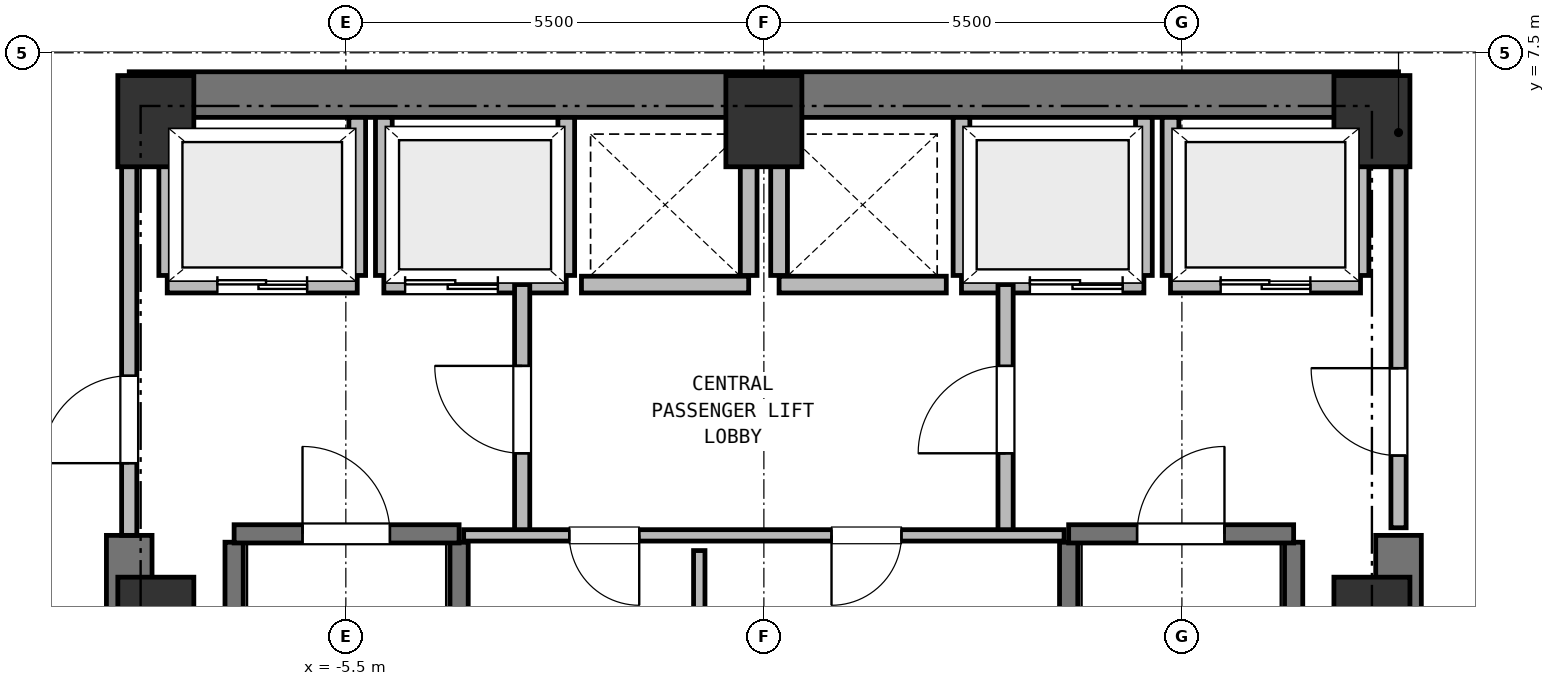
"""IFC4 building model, lengths in metres.
Left out: names, types, materials, properties, quantities, classifications, styles, units other than length and angle.
Written with IfcOpenShell. Run it as: python <this file> out.ifc"""

import sys

from ifc_helpers import new_model, si_unit, direction, frame, frame_2d, origin, origin_2d, place, context, subcontext, project, spatial, rectangle, extrude, element, fill, save


model = new_model("IFC4")
c1 = context("Model", 3, precision=1e-05, world=origin(), true_north=direction((0.0, 1.0)))
c2 = subcontext(c1, "Body", "Model", "MODEL_VIEW")
j1 = project(units=[si_unit("LENGTHUNIT", "METRE"), si_unit("PLANEANGLEUNIT", "RADIAN")], contexts=[c1])
p1 = place(None, origin())
s1 = spatial("IfcSite", under=j1, at=p1, CompositionType="ELEMENT")
p2 = place(p1, origin())
s2 = spatial("IfcBuilding", under=s1, at=p2, CompositionType="ELEMENT")
p3 = place(p2, frame((0.0, 0.0, 142.25)))
s3 = spatial("IfcBuildingStorey", under=s2, at=p3, CompositionType="ELEMENT", Elevation=142.25)
for number, where, z_axis, x_axis in (
    (1, (8.0, 0.0, 0.0), (0.0, 0.0, 1.0), (1.0, 0.0, 0.0)),
    (2, (8.0, 6.6, 0.0), (0.0, 0.0, 1.0), (1.0, 0.0, 0.0)),
    (3, (0.0, 6.6, 0.0), (0.0, 0.0, 1.0), (1.0, 0.0, 0.0)),
    (4, (-8.0, 6.6, 0.0), (0.0, 0.0, 1.0), (1.0, 0.0, 0.0)),
    (5, (-8.0, 0.0, 0.0), (0.0, 0.0, 1.0), (1.0, 0.0, 0.0)),
):
    element("IfcColumn", number, at=place(p3, frame(where, z_axis=z_axis, x_axis=x_axis)), inside=s3, PredefinedType="COLUMN", context=c2, shape_type="SweptSolid", body=[
        extrude(rectangle(XDim=1.0, YDim=1.2, at=origin_2d()), origin(), (0.0, 0.0, 1.0), 3.75),
    ])
p4 = place(p3, frame((-8.35, 6.95, 0.0), z_axis=(0.0, 0.0, 1.0), x_axis=(1.0, 0.0, 0.0)))
e6 = element("IfcWall", 6, at=p4, inside=s3, PredefinedType="SHEAR", context=c2, shape_type="SweptSolid", body=[
    extrude(rectangle(XDim=16.7, YDim=0.6, at=frame_2d((8.35, 0.0))), origin(), (0.0, 0.0, 1.0), 3.5),
])
for number, where, z_axis, x_axis in (
    (7, (-8.35, -6.95, 0.0), (0.0, 0.0, 1.0), (0.0, 1.0, 0.0)),
    (8, (8.35, -6.95, 0.0), (0.0, 0.0, 1.0), (0.0, 1.0, 0.0)),
):
    element("IfcWall", number, at=place(p3, frame(where, z_axis=z_axis, x_axis=x_axis)), inside=s3, PredefinedType="SHEAR", context=c2, shape_type="SweptSolid", body=[
        extrude(rectangle(XDim=8.1, YDim=0.6, at=frame_2d((4.05, 0.0))), origin(), (0.0, 0.0, 1.0), 3.5),
    ])
for number, where, z_axis, x_axis in (
    (9, (-6.97, -6.16, 0.0), (0.0, 0.0, 1.0), (0.0, 1.0, 0.0)),
    (10, (-4.01, -6.16, 0.0), (0.0, 0.0, 1.0), (0.0, 1.0, 0.0)),
):
    element("IfcWall", number, at=place(p3, frame(where, z_axis=z_axis, x_axis=x_axis)), inside=s3, PredefinedType="SHEAR", context=c2, shape_type="SweptSolid", body=[
        extrude(rectangle(XDim=7.22, YDim=0.24, at=frame_2d((3.61, 0.0))), origin(), (0.0, 0.0, 1.0), 3.5),
    ])
p5 = place(p3, frame((-6.97, 1.17, 0.0), z_axis=(0.0, 0.0, 1.0), x_axis=(1.0, 0.0, 0.0)))
e11 = element("IfcWall", 11, at=p5, inside=s3, PredefinedType="SHEAR", context=c2, shape_type="SweptSolid", body=[
    extrude(rectangle(XDim=2.96, YDim=0.24, at=frame_2d((1.48, 0.0))), origin(), (0.0, 0.0, 1.0), 3.5),
])
p6 = place(p5, frame((0.9, 0.0, 0.0)))
e12 = element("IfcOpeningElement", 12, at=p6, cuts=e11, PredefinedType="OPENING", context=c2, shape_type="SweptSolid", body=[
    extrude(rectangle(XDim=1.15, YDim=2.15, at=frame_2d((0.575, 1.075))), frame((0.0, 0.13, 0.0), z_axis=(0.0, -1.0, 0.0), x_axis=(1.0, 0.0, 0.0)), (0.0, 0.0, 1.0), 0.26),
])
for number, where, z_axis, x_axis in (
    (13, (4.01, -6.16, 0.0), (0.0, 0.0, 1.0), (0.0, 1.0, 0.0)),
    (14, (6.97, -6.16, 0.0), (0.0, 0.0, 1.0), (0.0, 1.0, 0.0)),
):
    element("IfcWall", number, at=place(p3, frame(where, z_axis=z_axis, x_axis=x_axis)), inside=s3, PredefinedType="SHEAR", context=c2, shape_type="SweptSolid", body=[
        extrude(rectangle(XDim=7.22, YDim=0.24, at=frame_2d((3.61, 0.0))), origin(), (0.0, 0.0, 1.0), 3.5),
    ])
p7 = place(p3, frame((4.01, 1.17, 0.0), z_axis=(0.0, 0.0, 1.0), x_axis=(1.0, 0.0, 0.0)))
e15 = element("IfcWall", 15, at=p7, inside=s3, PredefinedType="SHEAR", context=c2, shape_type="SweptSolid", body=[
    extrude(rectangle(XDim=2.96, YDim=0.24, at=frame_2d((1.48, 0.0))), origin(), (0.0, 0.0, 1.0), 3.5),
])
p8 = place(p7, frame((0.9, 0.0, 0.0)))
e16 = element("IfcOpeningElement", 16, at=p8, cuts=e15, PredefinedType="OPENING", context=c2, shape_type="SweptSolid", body=[
    extrude(rectangle(XDim=1.15, YDim=2.15, at=frame_2d((0.575, 1.075))), frame((0.0, 0.13, 0.0), z_axis=(0.0, -1.0, 0.0), x_axis=(1.0, 0.0, 0.0)), (0.0, 0.0, 1.0), 0.26),
])
p9 = place(p3, frame((-7.85, 4.45, 0.0), z_axis=(0.0, 0.0, 1.0), x_axis=(1.0, 0.0, 0.0)))
e17 = element("IfcWall", 17, at=p9, inside=s3, PredefinedType="PARTITIONING", context=c2, shape_type="SweptSolid", body=[
    extrude(rectangle(XDim=2.5, YDim=0.22, at=frame_2d((1.25, 0.0))), origin(), (0.0, 0.0, 1.0), 3.5),
])
p10 = place(p9, frame((0.66, 0.0, 0.0)))
e18 = element("IfcOpeningElement", 18, at=p10, cuts=e17, PredefinedType="OPENING", context=c2, shape_type="SweptSolid", body=[
    extrude(rectangle(XDim=1.18, YDim=2.15, at=frame_2d((0.59, 1.075))), frame((0.0, 0.12, 0.0), z_axis=(0.0, -1.0, 0.0), x_axis=(1.0, 0.0, 0.0)), (0.0, 0.0, 1.0), 0.24),
])
p11 = place(p3, frame((-7.85, 4.57, 0.0), z_axis=(0.0, 0.0, 1.0), x_axis=(0.0, 1.0, 0.0)))
e19 = element("IfcWall", 19, at=p11, inside=s3, PredefinedType="PARTITIONING", context=c2, shape_type="SweptSolid", body=[
    extrude(rectangle(XDim=2.08, YDim=0.22, at=frame_2d((1.04, 0.0))), origin(), (0.0, 0.0, 1.0), 3.12),
])
p12 = place(p3, frame((-5.35, 4.57, 0.0), z_axis=(0.0, 0.0, 1.0), x_axis=(0.0, 1.0, 0.0)))
e20 = element("IfcWall", 20, at=p12, inside=s3, PredefinedType="PARTITIONING", context=c2, shape_type="SweptSolid", body=[
    extrude(rectangle(XDim=2.08, YDim=0.22, at=frame_2d((1.04, 0.0))), origin(), (0.0, 0.0, 1.0), 3.5),
])
p13 = place(p3, frame((5.35, 4.45, 0.0), z_axis=(0.0, 0.0, 1.0), x_axis=(1.0, 0.0, 0.0)))
e21 = element("IfcWall", 21, at=p13, inside=s3, PredefinedType="PARTITIONING", context=c2, shape_type="SweptSolid", body=[
    extrude(rectangle(XDim=2.5, YDim=0.22, at=frame_2d((1.25, 0.0))), origin(), (0.0, 0.0, 1.0), 3.5),
])
p14 = place(p13, frame((0.66, 0.0, 0.0)))
e22 = element("IfcOpeningElement", 22, at=p14, cuts=e21, PredefinedType="OPENING", context=c2, shape_type="SweptSolid", body=[
    extrude(rectangle(XDim=1.18, YDim=2.15, at=frame_2d((0.59, 1.075))), frame((0.0, 0.12, 0.0), z_axis=(0.0, -1.0, 0.0), x_axis=(1.0, 0.0, 0.0)), (0.0, 0.0, 1.0), 0.24),
])
p15 = place(p3, frame((5.35, 4.57, 0.0), z_axis=(0.0, 0.0, 1.0), x_axis=(0.0, 1.0, 0.0)))
e23 = element("IfcWall", 23, at=p15, inside=s3, PredefinedType="PARTITIONING", context=c2, shape_type="SweptSolid", body=[
    extrude(rectangle(XDim=2.08, YDim=0.22, at=frame_2d((1.04, 0.0))), origin(), (0.0, 0.0, 1.0), 3.5),
])
p16 = place(p3, frame((7.85, 4.57, 0.0), z_axis=(0.0, 0.0, 1.0), x_axis=(0.0, 1.0, 0.0)))
e24 = element("IfcWall", 24, at=p16, inside=s3, PredefinedType="PARTITIONING", context=c2, shape_type="SweptSolid", body=[
    extrude(rectangle(XDim=2.08, YDim=0.22, at=frame_2d((1.04, 0.0))), origin(), (0.0, 0.0, 1.0), 3.12),
])
p17 = place(p3, frame((-5.0, 4.45, 0.0), z_axis=(0.0, 0.0, 1.0), x_axis=(1.0, 0.0, 0.0)))
e25 = element("IfcWall", 25, at=p17, inside=s3, PredefinedType="PARTITIONING", context=c2, shape_type="SweptSolid", body=[
    extrude(rectangle(XDim=2.4, YDim=0.22, at=frame_2d((1.2, 0.0))), origin(), (0.0, 0.0, 1.0), 3.5),
])
p18 = place(p17, frame((0.28, 0.0, 0.0)))
e26 = element("IfcOpeningElement", 26, at=p18, cuts=e25, PredefinedType="OPENING", context=c2, shape_type="SweptSolid", body=[
    extrude(rectangle(XDim=1.22, YDim=2.15, at=frame_2d((0.61, 1.075))), frame((0.0, 0.12, 0.0), z_axis=(0.0, -1.0, 0.0), x_axis=(1.0, 0.0, 0.0)), (0.0, 0.0, 1.0), 0.24),
])
for number, where, z_axis, x_axis in (
    (27, (-5.0, 4.57, 0.0), (0.0, 0.0, 1.0), (0.0, 1.0, 0.0)),
    (28, (-2.6, 4.57, 0.0), (0.0, 0.0, 1.0), (0.0, 1.0, 0.0)),
):
    element("IfcWall", number, at=place(p3, frame(where, z_axis=z_axis, x_axis=x_axis)), inside=s3, PredefinedType="PARTITIONING", context=c2, shape_type="SweptSolid", body=[
        extrude(rectangle(XDim=2.08, YDim=0.22, at=frame_2d((1.04, 0.0))), origin(), (0.0, 0.0, 1.0), 3.5),
    ])
p19 = place(p3, frame((2.6, 4.45, 0.0), z_axis=(0.0, 0.0, 1.0), x_axis=(1.0, 0.0, 0.0)))
e29 = element("IfcWall", 29, at=p19, inside=s3, PredefinedType="PARTITIONING", context=c2, shape_type="SweptSolid", body=[
    extrude(rectangle(XDim=2.4, YDim=0.22, at=frame_2d((1.2, 0.0))), origin(), (0.0, 0.0, 1.0), 3.5),
])
p20 = place(p19, frame((0.9, 0.0, 0.0)))
e30 = element("IfcOpeningElement", 30, at=p20, cuts=e29, PredefinedType="OPENING", context=c2, shape_type="SweptSolid", body=[
    extrude(rectangle(XDim=1.22, YDim=2.15, at=frame_2d((0.61, 1.075))), frame((0.0, 0.12, 0.0), z_axis=(0.0, -1.0, 0.0), x_axis=(1.0, 0.0, 0.0)), (0.0, 0.0, 1.0), 0.24),
])
for number, where, z_axis, x_axis in (
    (31, (2.6, 4.57, 0.0), (0.0, 0.0, 1.0), (0.0, 1.0, 0.0)),
    (32, (5.0, 4.57, 0.0), (0.0, 0.0, 1.0), (0.0, 1.0, 0.0)),
):
    element("IfcWall", number, at=place(p3, frame(where, z_axis=z_axis, x_axis=x_axis)), inside=s3, PredefinedType="PARTITIONING", context=c2, shape_type="SweptSolid", body=[
        extrude(rectangle(XDim=2.08, YDim=0.22, at=frame_2d((1.04, 0.0))), origin(), (0.0, 0.0, 1.0), 3.5),
    ])
p21 = place(p3, frame((-2.4, 4.45, 0.0), z_axis=(0.0, 0.0, 1.0), x_axis=(1.0, 0.0, 0.0)))
e33 = element("IfcWall", 33, at=p21, inside=s3, PredefinedType="PARTITIONING", context=c2, shape_type="SweptSolid", body=[
    extrude(rectangle(XDim=2.2, YDim=0.22, at=frame_2d((1.1, 0.0))), origin(), (0.0, 0.0, 1.0), 3.5),
])
p22 = place(p3, frame((-0.2, 4.57, 0.0), z_axis=(0.0, 0.0, 1.0), x_axis=(0.0, 1.0, 0.0)))
e34 = element("IfcWall", 34, at=p22, inside=s3, PredefinedType="PARTITIONING", context=c2, shape_type="SweptSolid", body=[
    extrude(rectangle(XDim=2.08, YDim=0.22, at=frame_2d((1.04, 0.0))), origin(), (0.0, 0.0, 1.0), 3.5),
])
p23 = place(p3, frame((0.2, 4.45, 0.0), z_axis=(0.0, 0.0, 1.0), x_axis=(1.0, 0.0, 0.0)))
e35 = element("IfcWall", 35, at=p23, inside=s3, PredefinedType="PARTITIONING", context=c2, shape_type="SweptSolid", body=[
    extrude(rectangle(XDim=2.2, YDim=0.22, at=frame_2d((1.1, 0.0))), origin(), (0.0, 0.0, 1.0), 3.5),
])
p24 = place(p3, frame((0.2, 4.57, 0.0), z_axis=(0.0, 0.0, 1.0), x_axis=(0.0, 1.0, 0.0)))
e36 = element("IfcWall", 36, at=p24, inside=s3, PredefinedType="PARTITIONING", context=c2, shape_type="SweptSolid", body=[
    extrude(rectangle(XDim=2.08, YDim=0.22, at=frame_2d((1.04, 0.0))), origin(), (0.0, 0.0, 1.0), 3.5),
])
p25 = place(p3, frame((-3.18, 1.15, 0.0), z_axis=(0.0, 0.0, 1.0), x_axis=(0.0, 1.0, 0.0)))
e37 = element("IfcWall", 37, at=p25, inside=s3, PredefinedType="PARTITIONING", context=c2, shape_type="SweptSolid", body=[
    extrude(rectangle(XDim=3.3, YDim=0.2, at=frame_2d((1.65, 0.0))), origin(), (0.0, 0.0, 1.0), 3.5),
])
p26 = place(p25, frame((1.08, 0.0, 0.0)))
e38 = element("IfcOpeningElement", 38, at=p26, cuts=e37, PredefinedType="OPENING", context=c2, shape_type="SweptSolid", body=[
    extrude(rectangle(XDim=1.15, YDim=2.15, at=frame_2d((0.575, 1.075))), frame((0.0, 0.11, 0.0), z_axis=(0.0, -1.0, 0.0), x_axis=(1.0, 0.0, 0.0)), (0.0, 0.0, 1.0), 0.22),
])
p27 = place(p3, frame((3.18, 1.15, 0.0), z_axis=(0.0, 0.0, 1.0), x_axis=(0.0, 1.0, 0.0)))
e39 = element("IfcWall", 39, at=p27, inside=s3, PredefinedType="PARTITIONING", context=c2, shape_type="SweptSolid", body=[
    extrude(rectangle(XDim=3.3, YDim=0.2, at=frame_2d((1.65, 0.0))), origin(), (0.0, 0.0, 1.0), 3.5),
])
p28 = place(p27, frame((1.08, 0.0, 0.0)))
e40 = element("IfcOpeningElement", 40, at=p28, cuts=e39, PredefinedType="OPENING", context=c2, shape_type="SweptSolid", body=[
    extrude(rectangle(XDim=1.15, YDim=2.15, at=frame_2d((0.575, 1.075))), frame((0.0, 0.11, 0.0), z_axis=(0.0, -1.0, 0.0), x_axis=(1.0, 0.0, 0.0)), (0.0, 0.0, 1.0), 0.22),
])
p29 = place(p3, frame((-8.35, 1.15, 0.0), z_axis=(0.0, 0.0, 1.0), x_axis=(0.0, 1.0, 0.0)))
e41 = element("IfcWall", 41, at=p29, inside=s3, PredefinedType="PARTITIONING", context=c2, shape_type="SweptSolid", body=[
    extrude(rectangle(XDim=5.4, YDim=0.2, at=frame_2d((2.7, 0.0))), origin(), (0.0, 0.0, 1.0), 3.5),
])
p30 = place(p29, frame((0.95, 0.0, 0.0)))
e42 = element("IfcOpeningElement", 42, at=p30, cuts=e41, PredefinedType="OPENING", context=c2, shape_type="SweptSolid", body=[
    extrude(rectangle(XDim=1.15, YDim=2.15, at=frame_2d((0.575, 1.075))), frame((0.0, 0.11, 0.0), z_axis=(0.0, -1.0, 0.0), x_axis=(1.0, 0.0, 0.0)), (0.0, 0.0, 1.0), 0.22),
])
p31 = place(p3, frame((8.35, 1.25, 0.0), z_axis=(0.0, 0.0, 1.0), x_axis=(0.0, 1.0, 0.0)))
e43 = element("IfcWall", 43, at=p31, inside=s3, PredefinedType="PARTITIONING", context=c2, shape_type="SweptSolid", body=[
    extrude(rectangle(XDim=5.3, YDim=0.2, at=frame_2d((2.65, 0.0))), origin(), (0.0, 0.0, 1.0), 3.5),
])
p32 = place(p31, frame((0.95, 0.0, 0.0)))
e44 = element("IfcOpeningElement", 44, at=p32, cuts=e43, PredefinedType="OPENING", context=c2, shape_type="SweptSolid", body=[
    extrude(rectangle(XDim=1.15, YDim=2.15, at=frame_2d((0.575, 1.075))), frame((0.0, 0.11, 0.0), z_axis=(0.0, -1.0, 0.0), x_axis=(1.0, 0.0, 0.0)), (0.0, 0.0, 1.0), 0.22),
])
p33 = place(p3, frame((3.95, 1.15, 0.0), z_axis=(0.0, 0.0, 1.0), x_axis=(-1.0, 0.0, 0.0)))
e45 = element("IfcWall", 45, at=p33, inside=s3, PredefinedType="PARTITIONING", context=c2, shape_type="SweptSolid", body=[
    extrude(rectangle(XDim=7.9, YDim=0.15, at=frame_2d((3.95, 0.0))), origin(), (0.0, 0.0, 1.0), 3.5),
])
p34 = place(p33, frame((5.59, 0.0, 0.0)))
e46 = element("IfcOpeningElement", 46, at=p34, cuts=e45, PredefinedType="OPENING", context=c2, shape_type="SweptSolid", body=[
    extrude(rectangle(XDim=0.92, YDim=2.05, at=frame_2d((0.46, 1.025))), frame((0.0, 0.085, 0.0), z_axis=(0.0, -1.0, 0.0), x_axis=(1.0, 0.0, 0.0)), (0.0, 0.0, 1.0), 0.17),
])
p35 = place(p33, frame((2.14, 0.0, 0.0)))
e47 = element("IfcOpeningElement", 47, at=p35, cuts=e45, PredefinedType="OPENING", context=c2, shape_type="SweptSolid", body=[
    extrude(rectangle(XDim=0.92, YDim=2.05, at=frame_2d((0.46, 1.025))), frame((0.0, 0.085, 0.0), z_axis=(0.0, -1.0, 0.0), x_axis=(1.0, 0.0, 0.0)), (0.0, 0.0, 1.0), 0.17),
])
p36 = place(p3, frame((-0.85, -6.58, 0.0), z_axis=(0.0, 0.0, 1.0), x_axis=(0.0, 1.0, 0.0)))
e48 = element("IfcWall", 48, at=p36, inside=s3, PredefinedType="PARTITIONING", context=c2, shape_type="SweptSolid", body=[
    extrude(rectangle(XDim=7.53, YDim=0.15, at=frame_2d((3.765, 0.0))), origin(), (0.0, 0.0, 1.0), 3.5),
])
for number, where, z_axis, x_axis in (
    (49, (8.678, 9.272, 0.0), (0.0, 0.0, 1.0), (0.707, -0.707, 0.0)),
    (50, (-10.722, 7.228, 0.0), (0.0, 0.0, 1.0), (0.707, 0.707, 0.0)),
):
    element("IfcWall", number, at=place(p3, frame(where, z_axis=z_axis, x_axis=x_axis)), inside=s3, PredefinedType="PARTITIONING", context=c2, shape_type="SweptSolid", body=[
        extrude(rectangle(XDim=2.89, YDim=0.15, at=frame_2d((1.445, 0.0))), origin(), (0.0, 0.0, 1.0), 3.5),
    ])
p37 = place(p6, origin())
e51 = element("IfcDoor", 51, at=p37, inside=s3, OperationType="SINGLE_SWING_LEFT", PredefinedType="DOOR", context=c2, shape_type="SweptSolid", body=[
    extrude(rectangle(XDim=1.15, YDim=2.15, at=frame_2d((0.575, 1.075))), frame((0.0, 0.025, 0.0), z_axis=(0.0, -1.0, 0.0), x_axis=(1.0, 0.0, 0.0)), (0.0, 0.0, 1.0), 0.05),
])
fill(e12, e51)
p38 = place(p8, origin())
e52 = element("IfcDoor", 52, at=p38, inside=s3, OperationType="SINGLE_SWING_RIGHT", PredefinedType="DOOR", context=c2, shape_type="SweptSolid", body=[
    extrude(rectangle(XDim=1.15, YDim=2.15, at=frame_2d((0.575, 1.075))), frame((0.0, 0.025, 0.0), z_axis=(0.0, -1.0, 0.0), x_axis=(1.0, 0.0, 0.0)), (0.0, 0.0, 1.0), 0.05),
])
fill(e16, e52)
p39 = place(p10, origin())
e53 = element("IfcDoor", 53, at=p39, inside=s3, OperationType="DOUBLE_DOOR_SLIDING", PredefinedType="DOOR", context=c2, shape_type="SweptSolid", body=[
    extrude(rectangle(XDim=1.18, YDim=2.15, at=frame_2d((0.59, 1.075))), frame((0.0, 0.025, 0.0), z_axis=(0.0, -1.0, 0.0), x_axis=(1.0, 0.0, 0.0)), (0.0, 0.0, 1.0), 0.05),
])
fill(e18, e53)
p40 = place(p14, origin())
e54 = element("IfcDoor", 54, at=p40, inside=s3, OperationType="DOUBLE_DOOR_SLIDING", PredefinedType="DOOR", context=c2, shape_type="SweptSolid", body=[
    extrude(rectangle(XDim=1.18, YDim=2.15, at=frame_2d((0.59, 1.075))), frame((0.0, 0.025, 0.0), z_axis=(0.0, -1.0, 0.0), x_axis=(1.0, 0.0, 0.0)), (0.0, 0.0, 1.0), 0.05),
])
fill(e22, e54)
p41 = place(p18, origin())
e55 = element("IfcDoor", 55, at=p41, inside=s3, OperationType="DOUBLE_DOOR_SLIDING", PredefinedType="DOOR", context=c2, shape_type="SweptSolid", body=[
    extrude(rectangle(XDim=1.22, YDim=2.15, at=frame_2d((0.61, 1.075))), frame((0.0, 0.025, 0.0), z_axis=(0.0, -1.0, 0.0), x_axis=(1.0, 0.0, 0.0)), (0.0, 0.0, 1.0), 0.05),
])
fill(e26, e55)
p42 = place(p20, origin())
e56 = element("IfcDoor", 56, at=p42, inside=s3, OperationType="DOUBLE_DOOR_SLIDING", PredefinedType="DOOR", context=c2, shape_type="SweptSolid", body=[
    extrude(rectangle(XDim=1.22, YDim=2.15, at=frame_2d((0.61, 1.075))), frame((0.0, 0.025, 0.0), z_axis=(0.0, -1.0, 0.0), x_axis=(1.0, 0.0, 0.0)), (0.0, 0.0, 1.0), 0.05),
])
fill(e30, e56)
p43 = place(p26, origin())
e57 = element("IfcDoor", 57, at=p43, inside=s3, OperationType="SINGLE_SWING_RIGHT", PredefinedType="DOOR", context=c2, shape_type="SweptSolid", body=[
    extrude(rectangle(XDim=1.15, YDim=2.15, at=frame_2d((0.575, 1.075))), frame((0.0, 0.025, 0.0), z_axis=(0.0, -1.0, 0.0), x_axis=(1.0, 0.0, 0.0)), (0.0, 0.0, 1.0), 0.05),
])
fill(e38, e57)
p44 = place(p28, origin())
e58 = element("IfcDoor", 58, at=p44, inside=s3, OperationType="SINGLE_SWING_LEFT", PredefinedType="DOOR", context=c2, shape_type="SweptSolid", body=[
    extrude(rectangle(XDim=1.15, YDim=2.15, at=frame_2d((0.575, 1.075))), frame((0.0, 0.025, 0.0), z_axis=(0.0, -1.0, 0.0), x_axis=(1.0, 0.0, 0.0)), (0.0, 0.0, 1.0), 0.05),
])
fill(e40, e58)
p45 = place(p30, origin())
e59 = element("IfcDoor", 59, at=p45, inside=s3, OperationType="SINGLE_SWING_LEFT", PredefinedType="DOOR", context=c2, shape_type="SweptSolid", body=[
    extrude(rectangle(XDim=1.15, YDim=2.15, at=frame_2d((0.575, 1.075))), frame((0.0, 0.025, 0.0), z_axis=(0.0, -1.0, 0.0), x_axis=(1.0, 0.0, 0.0)), (0.0, 0.0, 1.0), 0.05),
])
fill(e42, e59)
p46 = place(p32, origin())
e60 = element("IfcDoor", 60, at=p46, inside=s3, OperationType="SINGLE_SWING_RIGHT", PredefinedType="DOOR", context=c2, shape_type="SweptSolid", body=[
    extrude(rectangle(XDim=1.15, YDim=2.15, at=frame_2d((0.575, 1.075))), frame((0.0, 0.025, 0.0), z_axis=(0.0, -1.0, 0.0), x_axis=(1.0, 0.0, 0.0)), (0.0, 0.0, 1.0), 0.05),
])
fill(e44, e60)
p47 = place(p34, origin())
e61 = element("IfcDoor", 61, at=p47, inside=s3, OperationType="SINGLE_SWING_LEFT", PredefinedType="DOOR", context=c2, shape_type="SweptSolid", body=[
    extrude(rectangle(XDim=0.92, YDim=2.05, at=frame_2d((0.46, 1.025))), frame((0.0, 0.025, 0.0), z_axis=(0.0, -1.0, 0.0), x_axis=(1.0, 0.0, 0.0)), (0.0, 0.0, 1.0), 0.05),
])
fill(e46, e61)
p48 = place(p35, origin())
e62 = element("IfcDoor", 62, at=p48, inside=s3, OperationType="SINGLE_SWING_RIGHT", PredefinedType="DOOR", context=c2, shape_type="SweptSolid", body=[
    extrude(rectangle(XDim=0.92, YDim=2.05, at=frame_2d((0.46, 1.025))), frame((0.0, 0.025, 0.0), z_axis=(0.0, -1.0, 0.0), x_axis=(1.0, 0.0, 0.0)), (0.0, 0.0, 1.0), 0.05),
])
fill(e47, e62)
save(model, sys.argv[1])
